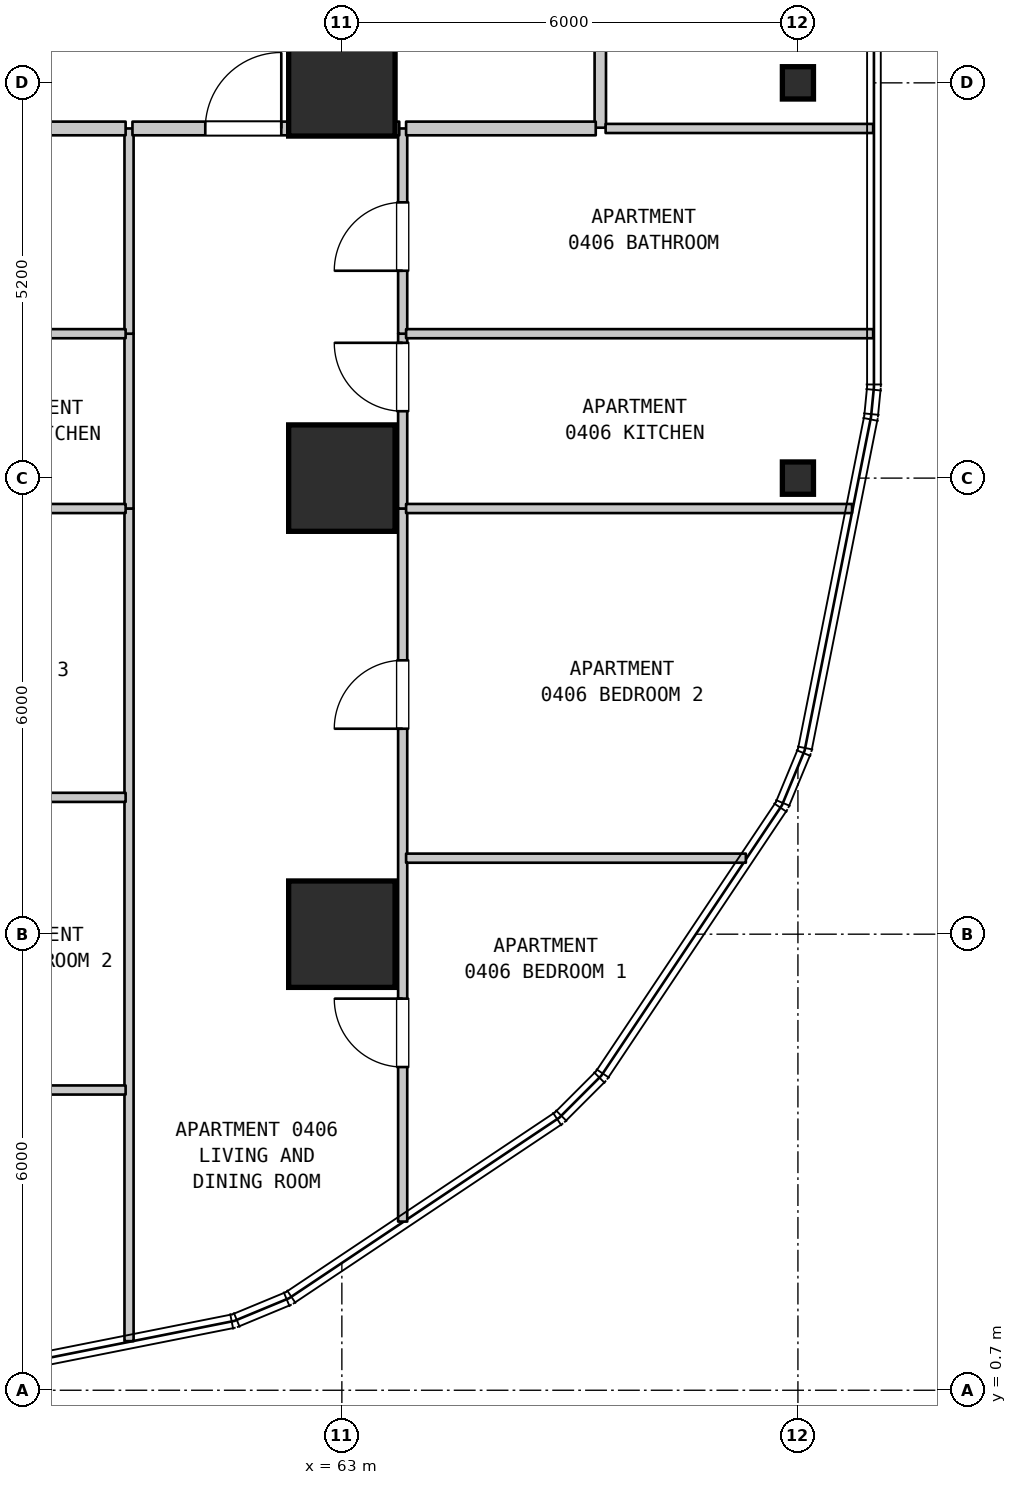
"""IFC4 building model, lengths in metres.
Left out: names, types, materials, properties, quantities, classifications, styles, units other than length and angle.
Written with IfcOpenShell. Run it as: python <this file> out.ifc"""

import sys

from ifc_helpers import new_model, si_unit, direction, frame, frame_2d, origin, origin_2d, place, context, subcontext, project, spatial, rectangle, i_section, extrude, element, fill, save


model = new_model("IFC4")
c1 = context("Model", 3, precision=1e-05, world=origin(), true_north=direction((0.0, 1.0)))
c2 = subcontext(c1, "Body", "Model", "MODEL_VIEW")
j1 = project(units=[si_unit("LENGTHUNIT", "METRE"), si_unit("PLANEANGLEUNIT", "RADIAN")], contexts=[c1])
p1 = place(None, origin())
s1 = spatial("IfcSite", under=j1, at=p1, CompositionType="ELEMENT")
p2 = place(p1, origin())
s2 = spatial("IfcBuilding", under=s1, at=p2, CompositionType="ELEMENT")
p3 = place(p2, frame((0.0, 0.0, 24.0)))
s3 = spatial("IfcBuildingStorey", under=s2, at=p3, CompositionType="ELEMENT", Elevation=24.0)
for number, where, z_axis, x_axis in (
    (1, (63.0, 6.7, 0.0), (0.0, 0.0, 1.0), (1.0, 0.0, 0.0)),
    (2, (63.0, 12.7, 0.0), (0.0, 0.0, 1.0), (1.0, 0.0, 0.0)),
    (3, (63.0, 17.9, 0.0), (0.0, 0.0, 1.0), (1.0, 0.0, 0.0)),
):
    element("IfcColumn", number, at=place(p3, frame(where, z_axis=z_axis, x_axis=x_axis)), inside=s3, PredefinedType="COLUMN", context=c2, shape_type="SweptSolid", body=[
        extrude(rectangle(XDim=1.4, YDim=1.4, at=origin_2d()), origin(), (0.0, 0.0, 1.0), 3.7),
    ])
for number, where, z_axis, x_axis in (
    (4, (69.0, 12.7, 0.0), (0.0, 0.0, 1.0), (1.0, 0.0, 0.0)),
    (5, (69.0, 17.9, 0.0), (0.0, 0.0, 1.0), (1.0, 0.0, 0.0)),
):
    element("IfcColumn", number, at=place(p3, frame(where, z_axis=z_axis, x_axis=x_axis)), inside=s3, PredefinedType="COLUMN", context=c2, shape_type="SweptSolid", body=[
        extrude(i_section(OverallWidth=0.409, OverallDepth=0.425, WebThickness=0.032, FlangeThickness=0.052, FilletRadius=0.015, at=origin_2d()), origin(), (0.0, 0.0, 1.0), 3.7),
    ])
p4 = place(p3, frame((60.2, 1.346, 0.0), z_axis=(0.0, 0.0, 1.0), x_axis=(0.0, 1.0, 0.0)))
e6 = element("IfcWall", 6, at=p4, inside=s3, PredefinedType="PARTITIONING", context=c2, shape_type="SweptSolid", body=[
    extrude(rectangle(XDim=10.954, YDim=0.12, at=frame_2d((5.477, 0.0))), origin(), (0.0, 0.0, 1.0), 3.385),
])
p5 = place(p3, frame((60.2, 12.3, 0.0), z_axis=(0.0, 0.0, 1.0), x_axis=(0.0, 1.0, 0.0)))
e7 = element("IfcWall", 7, at=p5, inside=s3, PredefinedType="PARTITIONING", context=c2, shape_type="SweptSolid", body=[
    extrude(rectangle(XDim=2.3, YDim=0.12, at=frame_2d((1.15, 0.0))), origin(), (0.0, 0.0, 1.0), 3.385),
])
p6 = place(p3, frame((60.2, 14.6, 0.0), z_axis=(0.0, 0.0, 1.0), x_axis=(0.0, 1.0, 0.0)))
e8 = element("IfcWall", 8, at=p6, inside=s3, PredefinedType="PARTITIONING", context=c2, shape_type="SweptSolid", body=[
    extrude(rectangle(XDim=2.7, YDim=0.12, at=frame_2d((1.35, 0.0))), origin(), (0.0, 0.0, 1.0), 3.385),
])
p7 = place(p3, frame((63.8, 2.919, 0.0), z_axis=(0.0, 0.0, 1.0), x_axis=(0.0, 1.0, 0.0)))
e9 = element("IfcWall", 9, at=p7, inside=s3, PredefinedType="PARTITIONING", context=c2, shape_type="SweptSolid", body=[
    extrude(rectangle(XDim=9.381, YDim=0.12, at=frame_2d((4.69, 0.0))), origin(), (0.0, 0.0, 1.0), 3.385),
])
p8 = place(p7, frame((2.033, 0.0, 0.0)))
e10 = element("IfcOpeningElement", 10, at=p8, cuts=e9, PredefinedType="OPENING", context=c2, shape_type="SweptSolid", body=[
    extrude(rectangle(XDim=0.9, YDim=2.15, at=frame_2d((0.45, 1.075))), frame((0.0, 0.07, 0.0), z_axis=(0.0, -1.0, 0.0), x_axis=(1.0, 0.0, 0.0)), (0.0, 0.0, 1.0), 0.14),
])
p9 = place(p7, frame((6.484, 0.0, 0.0)))
e11 = element("IfcOpeningElement", 11, at=p9, cuts=e9, PredefinedType="OPENING", context=c2, shape_type="SweptSolid", body=[
    extrude(rectangle(XDim=0.9, YDim=2.15, at=frame_2d((0.45, 1.075))), frame((0.0, 0.07, 0.0), z_axis=(0.0, -1.0, 0.0), x_axis=(1.0, 0.0, 0.0)), (0.0, 0.0, 1.0), 0.14),
])
p10 = place(p3, frame((63.8, 12.3, 0.0), z_axis=(0.0, 0.0, 1.0), x_axis=(0.0, 1.0, 0.0)))
e12 = element("IfcWall", 12, at=p10, inside=s3, PredefinedType="PARTITIONING", context=c2, shape_type="SweptSolid", body=[
    extrude(rectangle(XDim=2.3, YDim=0.12, at=frame_2d((1.15, 0.0))), origin(), (0.0, 0.0, 1.0), 3.385),
])
p11 = place(p10, frame((1.28, 0.0, 0.0)))
e13 = element("IfcOpeningElement", 13, at=p11, cuts=e12, PredefinedType="OPENING", context=c2, shape_type="SweptSolid", body=[
    extrude(rectangle(XDim=0.9, YDim=2.15, at=frame_2d((0.45, 1.075))), frame((0.0, 0.07, 0.0), z_axis=(0.0, -1.0, 0.0), x_axis=(1.0, 0.0, 0.0)), (0.0, 0.0, 1.0), 0.14),
])
p12 = place(p3, frame((63.8, 14.6, 0.0), z_axis=(0.0, 0.0, 1.0), x_axis=(0.0, 1.0, 0.0)))
e14 = element("IfcWall", 14, at=p12, inside=s3, PredefinedType="PARTITIONING", context=c2, shape_type="SweptSolid", body=[
    extrude(rectangle(XDim=2.7, YDim=0.12, at=frame_2d((1.35, 0.0))), origin(), (0.0, 0.0, 1.0), 3.385),
])
p13 = place(p12, frame((0.828, 0.0, 0.0)))
e15 = element("IfcOpeningElement", 15, at=p13, cuts=e14, PredefinedType="OPENING", context=c2, shape_type="SweptSolid", body=[
    extrude(rectangle(XDim=0.9, YDim=2.1, at=frame_2d((0.45, 1.05))), frame((0.0, 0.07, 0.0), z_axis=(0.0, -1.0, 0.0), x_axis=(1.0, 0.0, 0.0)), (0.0, 0.0, 1.0), 0.14),
])
p14 = place(p3, frame((66.4, 17.31, 0.0), z_axis=(0.0, 0.0, 1.0), x_axis=(0.0, 1.0, 0.0)))
e16 = element("IfcWall", 16, at=p14, inside=s3, PredefinedType="STANDARD", context=c2, shape_type="SweptSolid", body=[
    extrude(rectangle(XDim=2.34, YDim=0.15, at=frame_2d((1.17, 0.0))), origin(), (0.0, 0.0, 1.0), 3.385),
])
p15 = place(p3, frame((54.115, 4.65, 0.0), z_axis=(0.0, 0.0, 1.0), x_axis=(1.0, 0.0, 0.0)))
e17 = element("IfcWall", 17, at=p15, inside=s3, PredefinedType="PARTITIONING", context=c2, shape_type="SweptSolid", body=[
    extrude(rectangle(XDim=6.04, YDim=0.12, at=frame_2d((3.02, 0.0))), origin(), (0.0, 0.0, 1.0), 3.385),
])
p16 = place(p3, frame((63.845, 7.7, 0.0), z_axis=(0.0, 0.0, 1.0), x_axis=(1.0, 0.0, 0.0)))
e18 = element("IfcWall", 18, at=p16, inside=s3, PredefinedType="PARTITIONING", context=c2, shape_type="SweptSolid", body=[
    extrude(rectangle(XDim=4.47, YDim=0.12, at=frame_2d((2.235, 0.0))), origin(), (0.0, 0.0, 1.0), 3.385),
])
for number, where, z_axis, x_axis in (
    (19, (54.115, 8.5, 0.0), (0.0, 0.0, 1.0), (1.0, 0.0, 0.0)),
    (20, (54.115, 12.3, 0.0), (0.0, 0.0, 1.0), (1.0, 0.0, 0.0)),
):
    element("IfcWall", number, at=place(p3, frame(where, z_axis=z_axis, x_axis=x_axis)), inside=s3, PredefinedType="PARTITIONING", context=c2, shape_type="SweptSolid", body=[
        extrude(rectangle(XDim=6.04, YDim=0.12, at=frame_2d((3.02, 0.0))), origin(), (0.0, 0.0, 1.0), 3.385),
    ])
p17 = place(p3, frame((63.845, 12.3, 0.0), z_axis=(0.0, 0.0, 1.0), x_axis=(1.0, 0.0, 0.0)))
e21 = element("IfcWall", 21, at=p17, inside=s3, PredefinedType="PARTITIONING", context=c2, shape_type="SweptSolid", body=[
    extrude(rectangle(XDim=5.867, YDim=0.12, at=frame_2d((2.934, 0.0))), origin(), (0.0, 0.0, 1.0), 3.385),
])
p18 = place(p3, frame((54.115, 14.6, 0.0), z_axis=(0.0, 0.0, 1.0), x_axis=(1.0, 0.0, 0.0)))
e22 = element("IfcWall", 22, at=p18, inside=s3, PredefinedType="PARTITIONING", context=c2, shape_type="SweptSolid", body=[
    extrude(rectangle(XDim=6.04, YDim=0.12, at=frame_2d((3.02, 0.0))), origin(), (0.0, 0.0, 1.0), 3.385),
])
p19 = place(p3, frame((63.845, 14.6, 0.0), z_axis=(0.0, 0.0, 1.0), x_axis=(1.0, 0.0, 0.0)))
e23 = element("IfcWall", 23, at=p19, inside=s3, PredefinedType="PARTITIONING", context=c2, shape_type="SweptSolid", body=[
    extrude(rectangle(XDim=6.145, YDim=0.12, at=frame_2d((3.073, 0.0))), origin(), (0.0, 0.0, 1.0), 3.385),
])
p20 = place(p3, frame((54.115, 17.3, 0.0), z_axis=(0.0, 0.0, 1.0), x_axis=(1.0, 0.0, 0.0)))
e24 = element("IfcWall", 24, at=p20, inside=s3, PredefinedType="STANDARD", context=c2, shape_type="SweptSolid", body=[
    extrude(rectangle(XDim=6.04, YDim=0.18, at=frame_2d((3.02, 0.0))), origin(), (0.0, 0.0, 1.0), 3.385),
])
p21 = place(p3, frame((60.245, 17.3, 0.0), z_axis=(0.0, 0.0, 1.0), x_axis=(1.0, 0.0, 0.0)))
e25 = element("IfcWall", 25, at=p21, inside=s3, PredefinedType="STANDARD", context=c2, shape_type="SweptSolid", body=[
    extrude(rectangle(XDim=3.51, YDim=0.18, at=frame_2d((1.755, 0.0))), origin(), (0.0, 0.0, 1.0), 3.385),
])
p22 = place(p21, frame((0.958, 0.0, 0.0)))
e26 = element("IfcOpeningElement", 26, at=p22, cuts=e25, PredefinedType="OPENING", context=c2, shape_type="SweptSolid", body=[
    extrude(rectangle(XDim=1.0, YDim=2.15, at=frame_2d((0.5, 1.075))), frame((0.0, 0.1, 0.0), z_axis=(0.0, -1.0, 0.0), x_axis=(1.0, 0.0, 0.0)), (0.0, 0.0, 1.0), 0.2),
])
p23 = place(p3, frame((63.845, 17.3, 0.0), z_axis=(0.0, 0.0, 1.0), x_axis=(1.0, 0.0, 0.0)))
e27 = element("IfcWall", 27, at=p23, inside=s3, PredefinedType="STANDARD", context=c2, shape_type="SweptSolid", body=[
    extrude(rectangle(XDim=2.495, YDim=0.18, at=frame_2d((1.248, 0.0))), origin(), (0.0, 0.0, 1.0), 3.385),
])
p24 = place(p3, frame((66.47, 17.3, 0.0), z_axis=(0.0, 0.0, 1.0), x_axis=(1.0, 0.0, 0.0)))
e28 = element("IfcWall", 28, at=p24, inside=s3, PredefinedType="PARTITIONING", context=c2, shape_type="SweptSolid", body=[
    extrude(rectangle(XDim=3.52, YDim=0.12, at=frame_2d((1.76, 0.0))), origin(), (0.0, 0.0, 1.0), 3.385),
])
p25 = place(p8, origin())
e29 = element("IfcDoor", 29, at=p25, inside=s3, OperationType="SINGLE_SWING_RIGHT", PredefinedType="DOOR", context=c2, shape_type="SweptSolid", body=[
    extrude(rectangle(XDim=0.9, YDim=2.15, at=frame_2d((0.45, 1.075))), frame((0.0, 0.025, 0.0), z_axis=(0.0, -1.0, 0.0), x_axis=(1.0, 0.0, 0.0)), (0.0, 0.0, 1.0), 0.05),
])
fill(e10, e29)
p26 = place(p9, origin())
e30 = element("IfcDoor", 30, at=p26, inside=s3, OperationType="SINGLE_SWING_LEFT", PredefinedType="DOOR", context=c2, shape_type="SweptSolid", body=[
    extrude(rectangle(XDim=0.9, YDim=2.15, at=frame_2d((0.45, 1.075))), frame((0.0, 0.025, 0.0), z_axis=(0.0, -1.0, 0.0), x_axis=(1.0, 0.0, 0.0)), (0.0, 0.0, 1.0), 0.05),
])
fill(e11, e30)
p27 = place(p11, origin())
e31 = element("IfcDoor", 31, at=p27, inside=s3, OperationType="SINGLE_SWING_RIGHT", PredefinedType="DOOR", context=c2, shape_type="SweptSolid", body=[
    extrude(rectangle(XDim=0.9, YDim=2.15, at=frame_2d((0.45, 1.075))), frame((0.0, 0.025, 0.0), z_axis=(0.0, -1.0, 0.0), x_axis=(1.0, 0.0, 0.0)), (0.0, 0.0, 1.0), 0.05),
])
fill(e13, e31)
p28 = place(p13, origin())
e32 = element("IfcDoor", 32, at=p28, inside=s3, OperationType="SINGLE_SWING_LEFT", PredefinedType="DOOR", context=c2, shape_type="SweptSolid", body=[
    extrude(rectangle(XDim=0.9, YDim=2.1, at=frame_2d((0.45, 1.05))), frame((0.0, 0.025, 0.0), z_axis=(0.0, -1.0, 0.0), x_axis=(1.0, 0.0, 0.0)), (0.0, 0.0, 1.0), 0.05),
])
fill(e15, e32)
p29 = place(p22, origin())
e33 = element("IfcDoor", 33, at=p29, inside=s3, OperationType="SINGLE_SWING_RIGHT", PredefinedType="DOOR", context=c2, shape_type="SweptSolid", body=[
    extrude(rectangle(XDim=1.0, YDim=2.15, at=frame_2d((0.5, 1.075))), frame((0.0, 0.025, 0.0), z_axis=(0.0, -1.0, 0.0), x_axis=(1.0, 0.0, 0.0)), (0.0, 0.0, 1.0), 0.05),
])
fill(e26, e33)
save(model, sys.argv[1])
